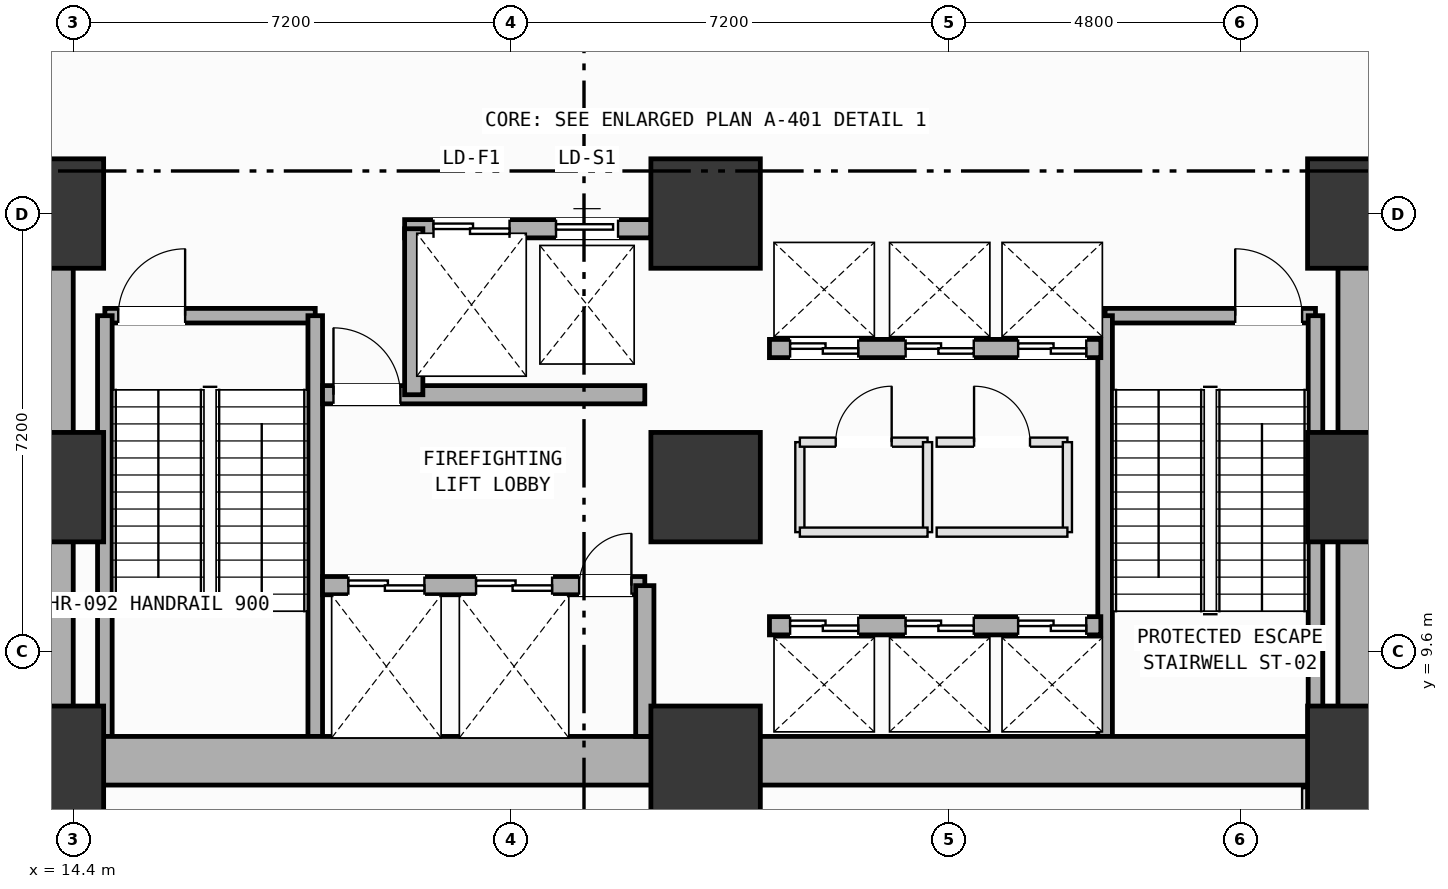
"""IFC4 building model, lengths in metres.
Left out: names, types, materials, properties, quantities, classifications, styles, units other than length and angle.
Written with IfcOpenShell. Run it as: python <this file> out.ifc"""

import sys

from ifc_helpers import new_model, si_unit, direction, frame, frame_2d, origin, origin_2d, place, context, subcontext, project, spatial, rectangle, extrude, element, fill, save


model = new_model("IFC4")
c1 = context("Model", 3, precision=1e-05, world=origin(), true_north=direction((0.0, 1.0)))
c2 = subcontext(c1, "Body", "Model", "MODEL_VIEW")
j1 = project(units=[si_unit("LENGTHUNIT", "METRE"), si_unit("PLANEANGLEUNIT", "RADIAN")], contexts=[c1])
p1 = place(None, origin())
s1 = spatial("IfcSite", under=j1, at=p1, CompositionType="ELEMENT")
p2 = place(p1, origin())
s2 = spatial("IfcBuilding", under=s1, at=p2, CompositionType="ELEMENT")
p3 = place(p2, frame((0.0, 0.0, -9.6)))
s3 = spatial("IfcBuildingStorey", under=s2, at=p3, CompositionType="ELEMENT", Elevation=-9.6)
for number, where, z_axis, x_axis in (
    (1, (14.0, 7.8, 0.0), (0.0, 0.0, 1.0), (1.0, 0.0, 0.0)),
    (2, (14.0, 12.3, 0.0), (0.0, 0.0, 1.0), (1.0, 0.0, 0.0)),
    (3, (14.0, 16.8, 0.0), (0.0, 0.0, 1.0), (1.0, 0.0, 0.0)),
    (4, (24.8, 7.8, 0.0), (0.0, 0.0, 1.0), (1.0, 0.0, 0.0)),
    (5, (24.8, 12.3, 0.0), (0.0, 0.0, 1.0), (1.0, 0.0, 0.0)),
    (6, (24.8, 16.8, 0.0), (0.0, 0.0, 1.0), (1.0, 0.0, 0.0)),
    (7, (35.6, 7.8, 0.0), (0.0, 0.0, 1.0), (1.0, 0.0, 0.0)),
    (8, (35.6, 12.3, 0.0), (0.0, 0.0, 1.0), (1.0, 0.0, 0.0)),
    (9, (35.6, 16.8, 0.0), (0.0, 0.0, 1.0), (1.0, 0.0, 0.0)),
):
    element("IfcColumn", number, at=place(p3, frame(where, z_axis=z_axis, x_axis=x_axis)), inside=s3, PredefinedType="COLUMN", context=c2, shape_type="SweptSolid", body=[
        extrude(rectangle(XDim=1.8, YDim=1.8, at=origin_2d()), origin(), (0.0, 0.0, 1.0), 4.8),
    ])
p4 = place(p3, frame((14.92, 15.12, 0.0), z_axis=(0.0, 0.0, 1.0), x_axis=(1.0, 0.0, 0.0)))
e10 = element("IfcWall", 10, at=p4, inside=s3, PredefinedType="SOLIDWALL", context=c2, shape_type="SweptSolid", body=[
    extrude(rectangle(XDim=3.46, YDim=0.24, at=frame_2d((1.73, 0.0))), origin(), (0.0, 0.0, 1.0), 4.55),
])
p5 = place(p4, frame((0.22, 0.0, 0.0)))
e11 = element("IfcOpeningElement", 11, at=p5, cuts=e10, PredefinedType="OPENING", context=c2, shape_type="SweptSolid", body=[
    extrude(rectangle(XDim=1.1, YDim=2.15, at=frame_2d((0.55, 1.075))), frame((0.0, 0.13, 0.0), z_axis=(0.0, -1.0, 0.0), x_axis=(1.0, 0.0, 0.0)), (0.0, 0.0, 1.0), 0.26),
])
for number, where, z_axis, x_axis in (
    (12, (18.38, 15.12, 0.0), (0.0, 0.0, 1.0), (0.0, -1.0, 0.0)),
    (13, (14.92, 8.2, 0.0), (0.0, 0.0, 1.0), (0.0, 1.0, 0.0)),
):
    element("IfcWall", number, at=place(p3, frame(where, z_axis=z_axis, x_axis=x_axis)), inside=s3, PredefinedType="SOLIDWALL", context=c2, shape_type="SweptSolid", body=[
        extrude(rectangle(XDim=6.92, YDim=0.24, at=frame_2d((3.46, 0.0))), origin(), (0.0, 0.0, 1.0), 4.55),
    ])
p6 = place(p3, frame((31.37, 15.12, 0.0), z_axis=(0.0, 0.0, 1.0), x_axis=(1.0, 0.0, 0.0)))
e14 = element("IfcWall", 14, at=p6, inside=s3, PredefinedType="SOLIDWALL", context=c2, shape_type="SweptSolid", body=[
    extrude(rectangle(XDim=3.46, YDim=0.24, at=frame_2d((1.73, 0.0))), origin(), (0.0, 0.0, 1.0), 4.55),
])
p7 = place(p6, frame((2.14, 0.0, 0.0)))
e15 = element("IfcOpeningElement", 15, at=p7, cuts=e14, PredefinedType="OPENING", context=c2, shape_type="SweptSolid", body=[
    extrude(rectangle(XDim=1.1, YDim=2.15, at=frame_2d((0.55, 1.075))), frame((0.0, 0.13, 0.0), z_axis=(0.0, -1.0, 0.0), x_axis=(1.0, 0.0, 0.0)), (0.0, 0.0, 1.0), 0.26),
])
for number, where, z_axis, x_axis in (
    (16, (34.83, 15.12, 0.0), (0.0, 0.0, 1.0), (0.0, -1.0, 0.0)),
    (17, (31.37, 8.2, 0.0), (0.0, 0.0, 1.0), (0.0, 1.0, 0.0)),
):
    element("IfcWall", number, at=place(p3, frame(where, z_axis=z_axis, x_axis=x_axis)), inside=s3, PredefinedType="SOLIDWALL", context=c2, shape_type="SweptSolid", body=[
        extrude(rectangle(XDim=6.92, YDim=0.24, at=frame_2d((3.46, 0.0))), origin(), (0.0, 0.0, 1.0), 4.55),
    ])
for number, where, z_axis, x_axis in (
    (18, (14.0, 7.8, 0.0), (0.0, 0.0, 1.0), (1.0, 0.0, 0.0)),
    (19, (24.8, 7.8, 0.0), (0.0, 0.0, 1.0), (1.0, 0.0, 0.0)),
):
    element("IfcWall", number, at=place(p3, frame(where, z_axis=z_axis, x_axis=x_axis)), inside=s3, PredefinedType="SHEAR", context=c2, shape_type="SweptSolid", body=[
        extrude(rectangle(XDim=10.8, YDim=0.8, at=frame_2d((5.4, 0.0))), origin(), (0.0, 0.0, 1.0), 4.55),
    ])
for number, where, z_axis, x_axis in (
    (20, (35.6, 7.8, 0.0), (0.0, 0.0, 1.0), (0.0, 1.0, 0.0)),
    (21, (14.0, 16.8, 0.0), (0.0, 0.0, 1.0), (0.0, -1.0, 0.0)),
):
    element("IfcWall", number, at=place(p3, frame(where, z_axis=z_axis, x_axis=x_axis)), inside=s3, PredefinedType="SHEAR", context=c2, shape_type="SweptSolid", body=[
        extrude(rectangle(XDim=9.0, YDim=0.8, at=frame_2d((4.5, 0.0))), origin(), (0.0, 0.0, 1.0), 4.55),
    ])
p8 = place(p3, frame((19.85, 16.55, 0.0), z_axis=(0.0, 0.0, 1.0), x_axis=(1.0, 0.0, 0.0)))
e22 = element("IfcWall", 22, at=p8, inside=s3, PredefinedType="SOLIDWALL", context=c2, shape_type="SweptSolid", body=[
    extrude(rectangle(XDim=4.05, YDim=0.3, at=frame_2d((2.025, 0.0))), origin(), (0.0, 0.0, 1.0), 4.55),
])
p9 = place(p8, frame((0.475, 0.0, 0.0)))
e23 = element("IfcOpeningElement", 23, at=p9, cuts=e22, PredefinedType="OPENING", context=c2, shape_type="SweptSolid", body=[
    extrude(rectangle(XDim=1.25, YDim=2.18, at=frame_2d((0.625, 1.09))), frame((0.0, 0.16, 0.0), z_axis=(0.0, -1.0, 0.0), x_axis=(1.0, 0.0, 0.0)), (0.0, 0.0, 1.0), 0.32),
])
p10 = place(p8, frame((2.49, 0.0, 0.0)))
e24 = element("IfcOpeningElement", 24, at=p10, cuts=e22, PredefinedType="OPENING", context=c2, shape_type="SweptSolid", body=[
    extrude(rectangle(XDim=1.02, YDim=2.12, at=frame_2d((0.51, 1.06))), frame((0.0, 0.16, 0.0), z_axis=(0.0, -1.0, 0.0), x_axis=(1.0, 0.0, 0.0)), (0.0, 0.0, 1.0), 0.32),
])
p11 = place(p3, frame((18.5, 10.68, 0.0), z_axis=(0.0, 0.0, 1.0), x_axis=(1.0, 0.0, 0.0)))
e25 = element("IfcWall", 25, at=p11, inside=s3, PredefinedType="SOLIDWALL", context=c2, shape_type="SweptSolid", body=[
    extrude(rectangle(XDim=5.3, YDim=0.3, at=frame_2d((2.65, 0.0))), origin(), (0.0, 0.0, 1.0), 4.55),
])
p12 = place(p11, frame((4.22, 0.0, 0.0)))
e26 = element("IfcOpeningElement", 26, at=p12, cuts=e25, PredefinedType="OPENING", context=c2, shape_type="SweptSolid", body=[
    extrude(rectangle(XDim=0.86, YDim=2.06, at=frame_2d((0.43, 1.03))), frame((0.0, 0.16, 0.0), z_axis=(0.0, -1.0, 0.0), x_axis=(1.0, 0.0, 0.0)), (0.0, 0.0, 1.0), 0.32),
])
p13 = place(p11, frame((0.425, 0.0, 0.0)))
e27 = element("IfcOpeningElement", 27, at=p13, cuts=e25, PredefinedType="OPENING", context=c2, shape_type="SweptSolid", body=[
    extrude(rectangle(XDim=1.25, YDim=2.18, at=frame_2d((0.625, 1.09))), frame((0.0, 0.16, 0.0), z_axis=(0.0, -1.0, 0.0), x_axis=(1.0, 0.0, 0.0)), (0.0, 0.0, 1.0), 0.32),
])
p14 = place(p11, frame((2.525, 0.0, 0.0)))
e28 = element("IfcOpeningElement", 28, at=p14, cuts=e25, PredefinedType="OPENING", context=c2, shape_type="SweptSolid", body=[
    extrude(rectangle(XDim=1.25, YDim=2.18, at=frame_2d((0.625, 1.09))), frame((0.0, 0.16, 0.0), z_axis=(0.0, -1.0, 0.0), x_axis=(1.0, 0.0, 0.0)), (0.0, 0.0, 1.0), 0.32),
])
p15 = place(p3, frame((18.5, 13.82, 0.0), z_axis=(0.0, 0.0, 1.0), x_axis=(1.0, 0.0, 0.0)))
e29 = element("IfcWall", 29, at=p15, inside=s3, PredefinedType="SOLIDWALL", context=c2, shape_type="SweptSolid", body=[
    extrude(rectangle(XDim=5.3, YDim=0.3, at=frame_2d((2.65, 0.0))), origin(), (0.0, 0.0, 1.0), 4.55),
])
p16 = place(p15, frame((0.18, 0.0, 0.0)))
e30 = element("IfcOpeningElement", 30, at=p16, cuts=e29, PredefinedType="OPENING", context=c2, shape_type="SweptSolid", body=[
    extrude(rectangle(XDim=1.1, YDim=2.15, at=frame_2d((0.55, 1.075))), frame((0.0, 0.16, 0.0), z_axis=(0.0, -1.0, 0.0), x_axis=(1.0, 0.0, 0.0)), (0.0, 0.0, 1.0), 0.32),
])
p17 = place(p3, frame((23.8, 8.2, 0.0), z_axis=(0.0, 0.0, 1.0), x_axis=(0.0, 1.0, 0.0)))
e31 = element("IfcWall", 31, at=p17, inside=s3, PredefinedType="SOLIDWALL", context=c2, shape_type="SweptSolid", body=[
    extrude(rectangle(XDim=2.48, YDim=0.3, at=frame_2d((1.24, 0.0))), origin(), (0.0, 0.0, 1.0), 4.55),
])
p18 = place(p3, frame((20.0, 13.82, 0.0), z_axis=(0.0, 0.0, 1.0), x_axis=(0.0, 1.0, 0.0)))
e32 = element("IfcWall", 32, at=p18, inside=s3, PredefinedType="SOLIDWALL", context=c2, shape_type="SweptSolid", body=[
    extrude(rectangle(XDim=2.73, YDim=0.3, at=frame_2d((1.365, 0.0))), origin(), (0.0, 0.0, 1.0), 4.55),
])
p19 = place(p3, frame((25.85, 10.02, 0.0), z_axis=(0.0, 0.0, 1.0), x_axis=(1.0, 0.0, 0.0)))
e33 = element("IfcWall", 33, at=p19, inside=s3, PredefinedType="SOLIDWALL", context=c2, shape_type="SweptSolid", body=[
    extrude(rectangle(XDim=5.45, YDim=0.3, at=frame_2d((2.725, 0.0))), origin(), (0.0, 0.0, 1.0), 4.55),
])
p20 = place(p19, frame((0.34, 0.0, 0.0)))
e34 = element("IfcOpeningElement", 34, at=p20, cuts=e33, PredefinedType="OPENING", context=c2, shape_type="SweptSolid", body=[
    extrude(rectangle(XDim=1.12, YDim=2.15, at=frame_2d((0.56, 1.075))), frame((0.0, 0.16, 0.0), z_axis=(0.0, -1.0, 0.0), x_axis=(1.0, 0.0, 0.0)), (0.0, 0.0, 1.0), 0.32),
])
p21 = place(p19, frame((2.24, 0.0, 0.0)))
e35 = element("IfcOpeningElement", 35, at=p21, cuts=e33, PredefinedType="OPENING", context=c2, shape_type="SweptSolid", body=[
    extrude(rectangle(XDim=1.12, YDim=2.15, at=frame_2d((0.56, 1.075))), frame((0.0, 0.16, 0.0), z_axis=(0.0, -1.0, 0.0), x_axis=(1.0, 0.0, 0.0)), (0.0, 0.0, 1.0), 0.32),
])
p22 = place(p19, frame((4.09, 0.0, 0.0)))
e36 = element("IfcOpeningElement", 36, at=p22, cuts=e33, PredefinedType="OPENING", context=c2, shape_type="SweptSolid", body=[
    extrude(rectangle(XDim=1.12, YDim=2.15, at=frame_2d((0.56, 1.075))), frame((0.0, 0.16, 0.0), z_axis=(0.0, -1.0, 0.0), x_axis=(1.0, 0.0, 0.0)), (0.0, 0.0, 1.0), 0.32),
])
p23 = place(p3, frame((25.85, 14.58, 0.0), z_axis=(0.0, 0.0, 1.0), x_axis=(1.0, 0.0, 0.0)))
e37 = element("IfcWall", 37, at=p23, inside=s3, PredefinedType="SOLIDWALL", context=c2, shape_type="SweptSolid", body=[
    extrude(rectangle(XDim=5.45, YDim=0.3, at=frame_2d((2.725, 0.0))), origin(), (0.0, 0.0, 1.0), 4.55),
])
p24 = place(p23, frame((0.34, 0.0, 0.0)))
e38 = element("IfcOpeningElement", 38, at=p24, cuts=e37, PredefinedType="OPENING", context=c2, shape_type="SweptSolid", body=[
    extrude(rectangle(XDim=1.12, YDim=2.15, at=frame_2d((0.56, 1.075))), frame((0.0, 0.16, 0.0), z_axis=(0.0, -1.0, 0.0), x_axis=(1.0, 0.0, 0.0)), (0.0, 0.0, 1.0), 0.32),
])
p25 = place(p23, frame((2.24, 0.0, 0.0)))
e39 = element("IfcOpeningElement", 39, at=p25, cuts=e37, PredefinedType="OPENING", context=c2, shape_type="SweptSolid", body=[
    extrude(rectangle(XDim=1.12, YDim=2.15, at=frame_2d((0.56, 1.075))), frame((0.0, 0.16, 0.0), z_axis=(0.0, -1.0, 0.0), x_axis=(1.0, 0.0, 0.0)), (0.0, 0.0, 1.0), 0.32),
])
p26 = place(p23, frame((4.09, 0.0, 0.0)))
e40 = element("IfcOpeningElement", 40, at=p26, cuts=e37, PredefinedType="OPENING", context=c2, shape_type="SweptSolid", body=[
    extrude(rectangle(XDim=1.12, YDim=2.15, at=frame_2d((0.56, 1.075))), frame((0.0, 0.16, 0.0), z_axis=(0.0, -1.0, 0.0), x_axis=(1.0, 0.0, 0.0)), (0.0, 0.0, 1.0), 0.32),
])
p27 = place(p3, frame((26.35, 11.56, 0.0), z_axis=(0.0, 0.0, 1.0), x_axis=(0.0, 1.0, 0.0)))
e41 = element("IfcWall", 41, at=p27, inside=s3, PredefinedType="PARTITIONING", context=c2, shape_type="SweptSolid", body=[
    extrude(rectangle(XDim=1.48, YDim=0.15, at=frame_2d((0.74, 0.0))), origin(), (0.0, 0.0, 1.0), 4.55),
])
p28 = place(p3, frame((26.35, 13.04, 0.0), z_axis=(0.0, 0.0, 1.0), x_axis=(1.0, 0.0, 0.0)))
e42 = element("IfcWall", 42, at=p28, inside=s3, PredefinedType="PARTITIONING", context=c2, shape_type="SweptSolid", body=[
    extrude(rectangle(XDim=2.1, YDim=0.15, at=frame_2d((1.05, 0.0))), origin(), (0.0, 0.0, 1.0), 4.55),
])
p29 = place(p28, frame((0.59, 0.0, 0.0)))
e43 = element("IfcOpeningElement", 43, at=p29, cuts=e42, PredefinedType="OPENING", context=c2, shape_type="SweptSolid", body=[
    extrude(rectangle(XDim=0.92, YDim=2.1, at=frame_2d((0.46, 1.05))), frame((0.0, 0.085, 0.0), z_axis=(0.0, -1.0, 0.0), x_axis=(1.0, 0.0, 0.0)), (0.0, 0.0, 1.0), 0.17),
])
p30 = place(p3, frame((28.45, 13.04, 0.0), z_axis=(0.0, 0.0, 1.0), x_axis=(0.0, -1.0, 0.0)))
e44 = element("IfcWall", 44, at=p30, inside=s3, PredefinedType="PARTITIONING", context=c2, shape_type="SweptSolid", body=[
    extrude(rectangle(XDim=1.48, YDim=0.15, at=frame_2d((0.74, 0.0))), origin(), (0.0, 0.0, 1.0), 4.55),
])
p31 = place(p3, frame((28.45, 11.56, 0.0), z_axis=(0.0, 0.0, 1.0), x_axis=(-1.0, 0.0, 0.0)))
e45 = element("IfcWall", 45, at=p31, inside=s3, PredefinedType="PARTITIONING", context=c2, shape_type="SweptSolid", body=[
    extrude(rectangle(XDim=2.1, YDim=0.15, at=frame_2d((1.05, 0.0))), origin(), (0.0, 0.0, 1.0), 4.55),
])
p32 = place(p3, frame((28.6, 13.04, 0.0), z_axis=(0.0, 0.0, 1.0), x_axis=(1.0, 0.0, 0.0)))
e46 = element("IfcWall", 46, at=p32, inside=s3, PredefinedType="PARTITIONING", context=c2, shape_type="SweptSolid", body=[
    extrude(rectangle(XDim=2.15, YDim=0.15, at=frame_2d((1.075, 0.0))), origin(), (0.0, 0.0, 1.0), 4.55),
])
p33 = place(p32, frame((0.615, 0.0, 0.0)))
e47 = element("IfcOpeningElement", 47, at=p33, cuts=e46, PredefinedType="OPENING", context=c2, shape_type="SweptSolid", body=[
    extrude(rectangle(XDim=0.92, YDim=2.1, at=frame_2d((0.46, 1.05))), frame((0.0, 0.085, 0.0), z_axis=(0.0, -1.0, 0.0), x_axis=(1.0, 0.0, 0.0)), (0.0, 0.0, 1.0), 0.17),
])
p34 = place(p3, frame((30.75, 13.04, 0.0), z_axis=(0.0, 0.0, 1.0), x_axis=(0.0, -1.0, 0.0)))
e48 = element("IfcWall", 48, at=p34, inside=s3, PredefinedType="PARTITIONING", context=c2, shape_type="SweptSolid", body=[
    extrude(rectangle(XDim=1.48, YDim=0.15, at=frame_2d((0.74, 0.0))), origin(), (0.0, 0.0, 1.0), 4.55),
])
p35 = place(p3, frame((30.75, 11.56, 0.0), z_axis=(0.0, 0.0, 1.0), x_axis=(-1.0, 0.0, 0.0)))
e49 = element("IfcWall", 49, at=p35, inside=s3, PredefinedType="PARTITIONING", context=c2, shape_type="SweptSolid", body=[
    extrude(rectangle(XDim=2.15, YDim=0.15, at=frame_2d((1.075, 0.0))), origin(), (0.0, 0.0, 1.0), 4.55),
])
p36 = place(p3, frame((34.7, 7.35, 0.0), z_axis=(0.0, 0.0, 1.0), x_axis=(0.0, -1.0, 0.0)))
e50 = element("IfcWall", 50, at=p36, inside=s3, PredefinedType="PARTITIONING", context=c2, shape_type="SweptSolid", body=[
    extrude(rectangle(XDim=6.75, YDim=0.18, at=frame_2d((3.375, 0.0))), origin(), (0.0, 0.0, 1.0), 4.55),
])
p37 = place(p5, origin())
e51 = element("IfcDoor", 51, at=p37, inside=s3, OperationType="SINGLE_SWING_RIGHT", PredefinedType="DOOR", context=c2, shape_type="SweptSolid", body=[
    extrude(rectangle(XDim=1.1, YDim=2.15, at=frame_2d((0.55, 1.075))), frame((0.0, 0.025, 0.0), z_axis=(0.0, -1.0, 0.0), x_axis=(1.0, 0.0, 0.0)), (0.0, 0.0, 1.0), 0.05),
])
fill(e11, e51)
p38 = place(p7, origin())
e52 = element("IfcDoor", 52, at=p38, inside=s3, OperationType="SINGLE_SWING_LEFT", PredefinedType="DOOR", context=c2, shape_type="SweptSolid", body=[
    extrude(rectangle(XDim=1.1, YDim=2.15, at=frame_2d((0.55, 1.075))), frame((0.0, 0.025, 0.0), z_axis=(0.0, -1.0, 0.0), x_axis=(1.0, 0.0, 0.0)), (0.0, 0.0, 1.0), 0.05),
])
fill(e15, e52)
p39 = place(p12, origin())
e53 = element("IfcDoor", 53, at=p39, inside=s3, OperationType="SINGLE_SWING_RIGHT", PredefinedType="DOOR", context=c2, shape_type="SweptSolid", body=[
    extrude(rectangle(XDim=0.86, YDim=2.06, at=frame_2d((0.43, 1.03))), frame((0.0, 0.025, 0.0), z_axis=(0.0, -1.0, 0.0), x_axis=(1.0, 0.0, 0.0)), (0.0, 0.0, 1.0), 0.05),
])
fill(e26, e53)
p40 = place(p16, origin())
e54 = element("IfcDoor", 54, at=p40, inside=s3, OperationType="SINGLE_SWING_LEFT", PredefinedType="DOOR", context=c2, shape_type="SweptSolid", body=[
    extrude(rectangle(XDim=1.1, YDim=2.15, at=frame_2d((0.55, 1.075))), frame((0.0, 0.025, 0.0), z_axis=(0.0, -1.0, 0.0), x_axis=(1.0, 0.0, 0.0)), (0.0, 0.0, 1.0), 0.05),
])
fill(e30, e54)
p41 = place(p13, origin())
e55 = element("IfcDoor", 55, at=p41, inside=s3, OperationType="DOUBLE_DOOR_SLIDING", PredefinedType="DOOR", context=c2, shape_type="SweptSolid", body=[
    extrude(rectangle(XDim=1.25, YDim=2.18, at=frame_2d((0.625, 1.09))), frame((0.0, 0.025, 0.0), z_axis=(0.0, -1.0, 0.0), x_axis=(1.0, 0.0, 0.0)), (0.0, 0.0, 1.0), 0.05),
])
fill(e27, e55)
p42 = place(p14, origin())
e56 = element("IfcDoor", 56, at=p42, inside=s3, OperationType="DOUBLE_DOOR_SLIDING", PredefinedType="DOOR", context=c2, shape_type="SweptSolid", body=[
    extrude(rectangle(XDim=1.25, YDim=2.18, at=frame_2d((0.625, 1.09))), frame((0.0, 0.025, 0.0), z_axis=(0.0, -1.0, 0.0), x_axis=(1.0, 0.0, 0.0)), (0.0, 0.0, 1.0), 0.05),
])
fill(e28, e56)
p43 = place(p20, origin())
e57 = element("IfcDoor", 57, at=p43, inside=s3, OperationType="DOUBLE_DOOR_SLIDING", PredefinedType="DOOR", context=c2, shape_type="SweptSolid", body=[
    extrude(rectangle(XDim=1.12, YDim=2.15, at=frame_2d((0.56, 1.075))), frame((0.0, 0.025, 0.0), z_axis=(0.0, -1.0, 0.0), x_axis=(1.0, 0.0, 0.0)), (0.0, 0.0, 1.0), 0.05),
])
fill(e34, e57)
p44 = place(p21, origin())
e58 = element("IfcDoor", 58, at=p44, inside=s3, OperationType="DOUBLE_DOOR_SLIDING", PredefinedType="DOOR", context=c2, shape_type="SweptSolid", body=[
    extrude(rectangle(XDim=1.12, YDim=2.15, at=frame_2d((0.56, 1.075))), frame((0.0, 0.025, 0.0), z_axis=(0.0, -1.0, 0.0), x_axis=(1.0, 0.0, 0.0)), (0.0, 0.0, 1.0), 0.05),
])
fill(e35, e58)
p45 = place(p22, origin())
e59 = element("IfcDoor", 59, at=p45, inside=s3, OperationType="DOUBLE_DOOR_SLIDING", PredefinedType="DOOR", context=c2, shape_type="SweptSolid", body=[
    extrude(rectangle(XDim=1.12, YDim=2.15, at=frame_2d((0.56, 1.075))), frame((0.0, 0.025, 0.0), z_axis=(0.0, -1.0, 0.0), x_axis=(1.0, 0.0, 0.0)), (0.0, 0.0, 1.0), 0.05),
])
fill(e36, e59)
p46 = place(p24, origin())
e60 = element("IfcDoor", 60, at=p46, inside=s3, OperationType="DOUBLE_DOOR_SLIDING", PredefinedType="DOOR", context=c2, shape_type="SweptSolid", body=[
    extrude(rectangle(XDim=1.12, YDim=2.15, at=frame_2d((0.56, 1.075))), frame((0.0, 0.025, 0.0), z_axis=(0.0, -1.0, 0.0), x_axis=(1.0, 0.0, 0.0)), (0.0, 0.0, 1.0), 0.05),
])
fill(e38, e60)
p47 = place(p25, origin())
e61 = element("IfcDoor", 61, at=p47, inside=s3, OperationType="DOUBLE_DOOR_SLIDING", PredefinedType="DOOR", context=c2, shape_type="SweptSolid", body=[
    extrude(rectangle(XDim=1.12, YDim=2.15, at=frame_2d((0.56, 1.075))), frame((0.0, 0.025, 0.0), z_axis=(0.0, -1.0, 0.0), x_axis=(1.0, 0.0, 0.0)), (0.0, 0.0, 1.0), 0.05),
])
fill(e39, e61)
p48 = place(p26, origin())
e62 = element("IfcDoor", 62, at=p48, inside=s3, OperationType="DOUBLE_DOOR_SLIDING", PredefinedType="DOOR", context=c2, shape_type="SweptSolid", body=[
    extrude(rectangle(XDim=1.12, YDim=2.15, at=frame_2d((0.56, 1.075))), frame((0.0, 0.025, 0.0), z_axis=(0.0, -1.0, 0.0), x_axis=(1.0, 0.0, 0.0)), (0.0, 0.0, 1.0), 0.05),
])
fill(e40, e62)
p49 = place(p9, origin())
e63 = element("IfcDoor", 63, at=p49, inside=s3, OperationType="DOUBLE_DOOR_SLIDING", PredefinedType="DOOR", context=c2, shape_type="SweptSolid", body=[
    extrude(rectangle(XDim=1.25, YDim=2.18, at=frame_2d((0.625, 1.09))), frame((0.0, 0.025, 0.0), z_axis=(0.0, -1.0, 0.0), x_axis=(1.0, 0.0, 0.0)), (0.0, 0.0, 1.0), 0.05),
])
fill(e23, e63)
p50 = place(p10, origin())
e64 = element("IfcDoor", 64, at=p50, inside=s3, OperationType="SLIDING_TO_LEFT", PredefinedType="DOOR", context=c2, shape_type="SweptSolid", body=[
    extrude(rectangle(XDim=1.02, YDim=2.12, at=frame_2d((0.51, 1.06))), frame((0.0, 0.025, 0.0), z_axis=(0.0, -1.0, 0.0), x_axis=(1.0, 0.0, 0.0)), (0.0, 0.0, 1.0), 0.05),
])
fill(e24, e64)
p51 = place(p29, origin())
e65 = element("IfcDoor", 65, at=p51, inside=s3, OperationType="SINGLE_SWING_RIGHT", PredefinedType="DOOR", context=c2, shape_type="SweptSolid", body=[
    extrude(rectangle(XDim=0.92, YDim=2.1, at=frame_2d((0.46, 1.05))), frame((0.0, 0.025, 0.0), z_axis=(0.0, -1.0, 0.0), x_axis=(1.0, 0.0, 0.0)), (0.0, 0.0, 1.0), 0.05),
])
fill(e43, e65)
p52 = place(p33, origin())
e66 = element("IfcDoor", 66, at=p52, inside=s3, OperationType="SINGLE_SWING_LEFT", PredefinedType="DOOR", context=c2, shape_type="SweptSolid", body=[
    extrude(rectangle(XDim=0.92, YDim=2.1, at=frame_2d((0.46, 1.05))), frame((0.0, 0.025, 0.0), z_axis=(0.0, -1.0, 0.0), x_axis=(1.0, 0.0, 0.0)), (0.0, 0.0, 1.0), 0.05),
])
fill(e47, e66)
save(model, sys.argv[1])
